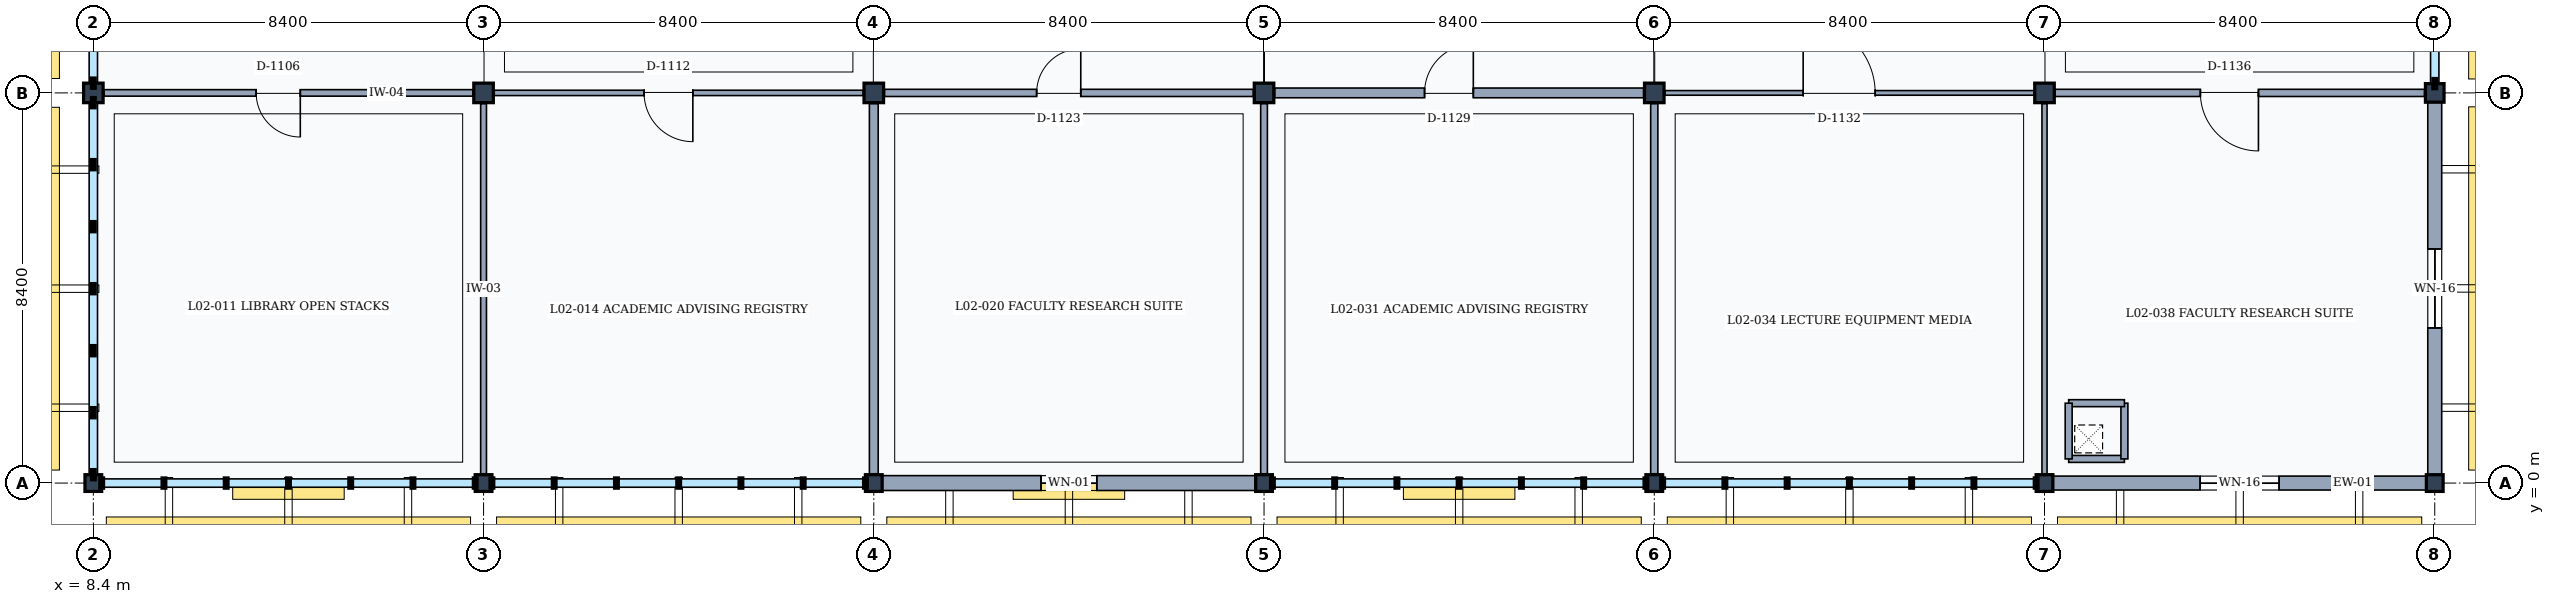
"""IFC4 building model, lengths in metres.
Left out: names, types, materials, properties, quantities, classifications, styles, units other than length and angle.
Written with IfcOpenShell. Run it as: python <this file> out.ifc"""

import sys

from ifc_helpers import new_model, si_unit, direction, frame, frame_2d, origin, origin_2d, place, context, subcontext, project, spatial, rectangle, extrude, element, fill, save


model = new_model("IFC4")
c1 = context("Model", 3, precision=1e-05, world=origin(), true_north=direction((0.0, 1.0)))
c2 = subcontext(c1, "Body", "Model", "MODEL_VIEW")
j1 = project(units=[si_unit("LENGTHUNIT", "METRE"), si_unit("PLANEANGLEUNIT", "RADIAN")], contexts=[c1])
p1 = place(None, origin())
s1 = spatial("IfcSite", under=j1, at=p1, CompositionType="ELEMENT")
p2 = place(p1, origin())
s2 = spatial("IfcBuilding", under=s1, at=p2, CompositionType="ELEMENT")
p3 = place(p2, frame((0.0, 0.0, 9.6)))
s3 = spatial("IfcBuildingStorey", under=s2, at=p3, CompositionType="ELEMENT", Elevation=9.6)
p4 = place(p3, frame((8.4, 0.0, 0.0), z_axis=(0.0, 0.0, 1.0), x_axis=(1.0, 0.0, 0.0)))
e1 = element("IfcColumn", 1, at=p4, inside=s3, PredefinedType="COLUMN", context=c2, shape_type="SweptSolid", body=[
    extrude(rectangle(XDim=0.36, YDim=0.36, at=origin_2d()), origin(), (0.0, 0.0, 1.0), 4.2),
])
p5 = place(p3, frame((8.4, 8.4, 0.0), z_axis=(0.0, 0.0, 1.0), x_axis=(1.0, 0.0, 0.0)))
e2 = element("IfcColumn", 2, at=p5, inside=s3, PredefinedType="COLUMN", context=c2, shape_type="SweptSolid", body=[
    extrude(rectangle(XDim=0.42, YDim=0.42, at=origin_2d()), origin(), (0.0, 0.0, 1.0), 4.2),
])
p6 = place(p3, frame((16.8, 0.0, 0.0), z_axis=(0.0, 0.0, 1.0), x_axis=(1.0, 0.0, 0.0)))
e3 = element("IfcColumn", 3, at=p6, inside=s3, PredefinedType="COLUMN", context=c2, shape_type="SweptSolid", body=[
    extrude(rectangle(XDim=0.36, YDim=0.36, at=origin_2d()), origin(), (0.0, 0.0, 1.0), 4.2),
])
p7 = place(p3, frame((16.8, 8.4, 0.0), z_axis=(0.0, 0.0, 1.0), x_axis=(1.0, 0.0, 0.0)))
e4 = element("IfcColumn", 4, at=p7, inside=s3, PredefinedType="COLUMN", context=c2, shape_type="SweptSolid", body=[
    extrude(rectangle(XDim=0.42, YDim=0.42, at=origin_2d()), origin(), (0.0, 0.0, 1.0), 4.2),
])
p8 = place(p3, frame((25.2, 0.0, 0.0), z_axis=(0.0, 0.0, 1.0), x_axis=(1.0, 0.0, 0.0)))
e5 = element("IfcColumn", 5, at=p8, inside=s3, PredefinedType="COLUMN", context=c2, shape_type="SweptSolid", body=[
    extrude(rectangle(XDim=0.36, YDim=0.36, at=origin_2d()), origin(), (0.0, 0.0, 1.0), 4.2),
])
p9 = place(p3, frame((25.2, 8.4, 0.0), z_axis=(0.0, 0.0, 1.0), x_axis=(1.0, 0.0, 0.0)))
e6 = element("IfcColumn", 6, at=p9, inside=s3, PredefinedType="COLUMN", context=c2, shape_type="SweptSolid", body=[
    extrude(rectangle(XDim=0.42, YDim=0.42, at=origin_2d()), origin(), (0.0, 0.0, 1.0), 4.2),
])
p10 = place(p3, frame((33.6, 0.0, 0.0), z_axis=(0.0, 0.0, 1.0), x_axis=(1.0, 0.0, 0.0)))
e7 = element("IfcColumn", 7, at=p10, inside=s3, PredefinedType="COLUMN", context=c2, shape_type="SweptSolid", body=[
    extrude(rectangle(XDim=0.36, YDim=0.36, at=origin_2d()), origin(), (0.0, 0.0, 1.0), 4.2),
])
p11 = place(p3, frame((33.6, 8.4, 0.0), z_axis=(0.0, 0.0, 1.0), x_axis=(1.0, 0.0, 0.0)))
e8 = element("IfcColumn", 8, at=p11, inside=s3, PredefinedType="COLUMN", context=c2, shape_type="SweptSolid", body=[
    extrude(rectangle(XDim=0.42, YDim=0.42, at=origin_2d()), origin(), (0.0, 0.0, 1.0), 4.2),
])
p12 = place(p3, frame((42.0, 0.0, 0.0), z_axis=(0.0, 0.0, 1.0), x_axis=(1.0, 0.0, 0.0)))
e9 = element("IfcColumn", 9, at=p12, inside=s3, PredefinedType="COLUMN", context=c2, shape_type="SweptSolid", body=[
    extrude(rectangle(XDim=0.36, YDim=0.36, at=origin_2d()), origin(), (0.0, 0.0, 1.0), 4.2),
])
p13 = place(p3, frame((42.0, 8.4, 0.0), z_axis=(0.0, 0.0, 1.0), x_axis=(1.0, 0.0, 0.0)))
e10 = element("IfcColumn", 10, at=p13, inside=s3, PredefinedType="COLUMN", context=c2, shape_type="SweptSolid", body=[
    extrude(rectangle(XDim=0.42, YDim=0.42, at=origin_2d()), origin(), (0.0, 0.0, 1.0), 4.2),
])
p14 = place(p3, frame((50.4, 0.0, 0.0), z_axis=(0.0, 0.0, 1.0), x_axis=(1.0, 0.0, 0.0)))
e11 = element("IfcColumn", 11, at=p14, inside=s3, PredefinedType="COLUMN", context=c2, shape_type="SweptSolid", body=[
    extrude(rectangle(XDim=0.36, YDim=0.36, at=origin_2d()), origin(), (0.0, 0.0, 1.0), 4.2),
])
p15 = place(p3, frame((50.4, 8.4, 0.0), z_axis=(0.0, 0.0, 1.0), x_axis=(1.0, 0.0, 0.0)))
e12 = element("IfcColumn", 12, at=p15, inside=s3, PredefinedType="COLUMN", context=c2, shape_type="SweptSolid", body=[
    extrude(rectangle(XDim=0.42, YDim=0.42, at=origin_2d()), origin(), (0.0, 0.0, 1.0), 4.2),
])
p16 = place(p3, frame((58.8, 0.0, 0.0), z_axis=(0.0, 0.0, 1.0), x_axis=(1.0, 0.0, 0.0)))
e13 = element("IfcColumn", 13, at=p16, inside=s3, PredefinedType="COLUMN", context=c2, shape_type="SweptSolid", body=[
    extrude(rectangle(XDim=0.36, YDim=0.36, at=origin_2d()), origin(), (0.0, 0.0, 1.0), 4.2),
])
p17 = place(p3, frame((58.8, 8.4, 0.0), z_axis=(0.0, 0.0, 1.0), x_axis=(1.0, 0.0, 0.0)))
e14 = element("IfcColumn", 14, at=p17, inside=s3, PredefinedType="COLUMN", context=c2, shape_type="SweptSolid", body=[
    extrude(rectangle(XDim=0.4, YDim=0.4, at=origin_2d()), origin(), (0.0, 0.0, 1.0), 4.2),
])
p18 = place(p3, frame((33.42, 0.0, 0.0), z_axis=(0.0, 0.0, 1.0), x_axis=(-1.0, 0.0, 0.0)))
e15 = element("IfcWall", 15, at=p18, inside=s3, PredefinedType="SOLIDWALL", context=c2, shape_type="SweptSolid", body=[
    extrude(rectangle(XDim=8.04, YDim=0.32, at=frame_2d((4.02, 0.0))), origin(), (0.0, 0.0, 1.0), 3.36),
])
p19 = place(p18, frame((3.42, 0.0, 0.9)))
e16 = element("IfcOpeningElement", 16, at=p19, cuts=e15, PredefinedType="OPENING", context=c2, shape_type="SweptSolid", body=[
    extrude(rectangle(XDim=1.2, YDim=1.8, at=frame_2d((0.6, 0.9))), frame((0.0, 0.17, 0.0), z_axis=(0.0, -1.0, 0.0), x_axis=(1.0, 0.0, 0.0)), (0.0, 0.0, 1.0), 0.34),
])
p20 = place(p3, frame((58.62, 0.0, 0.0), z_axis=(0.0, 0.0, 1.0), x_axis=(-1.0, 0.0, 0.0)))
e17 = element("IfcWall", 17, at=p20, inside=s3, PredefinedType="SOLIDWALL", context=c2, shape_type="SweptSolid", body=[
    extrude(rectangle(XDim=8.04, YDim=0.3, at=frame_2d((4.02, 0.0))), origin(), (0.0, 0.0, 1.0), 3.36),
])
p21 = place(p20, frame((3.17, 0.0, 0.9)))
e18 = element("IfcOpeningElement", 18, at=p21, cuts=e17, PredefinedType="OPENING", context=c2, shape_type="SweptSolid", body=[
    extrude(rectangle(XDim=1.7, YDim=1.55, at=frame_2d((0.85, 0.775))), frame((0.0, 0.16, 0.0), z_axis=(0.0, -1.0, 0.0), x_axis=(1.0, 0.0, 0.0)), (0.0, 0.0, 1.0), 0.32),
])
p22 = place(p3, frame((58.8, 8.2, 0.0), z_axis=(0.0, 0.0, 1.0), x_axis=(0.0, -1.0, 0.0)))
e19 = element("IfcWall", 19, at=p22, inside=s3, PredefinedType="SOLIDWALL", context=c2, shape_type="SweptSolid", body=[
    extrude(rectangle(XDim=8.02, YDim=0.3, at=frame_2d((4.01, 0.0))), origin(), (0.0, 0.0, 1.0), 3.36),
])
p23 = place(p22, frame((3.16, 0.0, 0.9)))
e20 = element("IfcOpeningElement", 20, at=p23, cuts=e19, PredefinedType="OPENING", context=c2, shape_type="SweptSolid", body=[
    extrude(rectangle(XDim=1.7, YDim=1.55, at=frame_2d((0.85, 0.775))), frame((0.0, 0.16, 0.0), z_axis=(0.0, -1.0, 0.0), x_axis=(1.0, 0.0, 0.0)), (0.0, 0.0, 1.0), 0.32),
])
p24 = place(p3, frame((50.92, 0.52, 0.0), z_axis=(0.0, 0.0, 1.0), x_axis=(1.0, 0.0, 0.0)))
e21 = element("IfcWall", 21, at=p24, inside=s3, PredefinedType="PARTITIONING", context=c2, shape_type="SweptSolid", body=[
    extrude(rectangle(XDim=1.2, YDim=0.15, at=frame_2d((0.6, 0.0))), origin(), (0.0, 0.0, 1.0), 3.93),
])
p25 = place(p3, frame((52.12, 0.52, 0.0), z_axis=(0.0, 0.0, 1.0), x_axis=(0.0, 1.0, 0.0)))
e22 = element("IfcWall", 22, at=p25, inside=s3, PredefinedType="PARTITIONING", context=c2, shape_type="SweptSolid", body=[
    extrude(rectangle(XDim=1.2, YDim=0.15, at=frame_2d((0.6, 0.0))), origin(), (0.0, 0.0, 1.0), 3.93),
])
p26 = place(p3, frame((52.12, 1.72, 0.0), z_axis=(0.0, 0.0, 1.0), x_axis=(-1.0, 0.0, 0.0)))
e23 = element("IfcWall", 23, at=p26, inside=s3, PredefinedType="PARTITIONING", context=c2, shape_type="SweptSolid", body=[
    extrude(rectangle(XDim=1.2, YDim=0.15, at=frame_2d((0.6, 0.0))), origin(), (0.0, 0.0, 1.0), 3.93),
])
p27 = place(p3, frame((50.92, 1.72, 0.0), z_axis=(0.0, 0.0, 1.0), x_axis=(0.0, -1.0, 0.0)))
e24 = element("IfcWall", 24, at=p27, inside=s3, PredefinedType="PARTITIONING", context=c2, shape_type="SweptSolid", body=[
    extrude(rectangle(XDim=1.2, YDim=0.15, at=frame_2d((0.6, 0.0))), origin(), (0.0, 0.0, 1.0), 3.93),
])
p28 = place(p3, frame((16.8, 0.2, 0.0), z_axis=(0.0, 0.0, 1.0), x_axis=(0.0, 1.0, 0.0)))
e25 = element("IfcWall", 25, at=p28, inside=s3, PredefinedType="PARTITIONING", context=c2, shape_type="SweptSolid", body=[
    extrude(rectangle(XDim=7.97, YDim=0.125, at=frame_2d((3.985, 0.0))), origin(), (0.0, 0.0, 1.0), 3.32),
])
p29 = place(p3, frame((8.63, 8.4, 0.0), z_axis=(0.0, 0.0, 1.0), x_axis=(1.0, 0.0, 0.0)))
e26 = element("IfcWall", 26, at=p29, inside=s3, PredefinedType="PARTITIONING", context=c2, shape_type="SweptSolid", body=[
    extrude(rectangle(XDim=7.94, YDim=0.14, at=frame_2d((3.97, 0.0))), origin(), (0.0, 0.0, 1.0), 3.32),
])
p30 = place(p29, frame((3.275, 0.0, 0.0)))
e27 = element("IfcOpeningElement", 27, at=p30, cuts=e26, PredefinedType="OPENING", context=c2, shape_type="SweptSolid", body=[
    extrude(rectangle(XDim=0.95, YDim=2.15, at=frame_2d((0.475, 1.075))), frame((0.0, 0.08, 0.0), z_axis=(0.0, -1.0, 0.0), x_axis=(1.0, 0.0, 0.0)), (0.0, 0.0, 1.0), 0.16),
])
p31 = place(p3, frame((25.2, 0.2, 0.0), z_axis=(0.0, 0.0, 1.0), x_axis=(0.0, 1.0, 0.0)))
e28 = element("IfcWall", 28, at=p31, inside=s3, PredefinedType="PARTITIONING", context=c2, shape_type="SweptSolid", body=[
    extrude(rectangle(XDim=7.97, YDim=0.19, at=frame_2d((3.985, 0.0))), origin(), (0.0, 0.0, 1.0), 3.32),
])
p32 = place(p3, frame((17.03, 8.4, 0.0), z_axis=(0.0, 0.0, 1.0), x_axis=(1.0, 0.0, 0.0)))
e29 = element("IfcWall", 29, at=p32, inside=s3, PredefinedType="PARTITIONING", context=c2, shape_type="SweptSolid", body=[
    extrude(rectangle(XDim=7.94, YDim=0.115, at=frame_2d((3.97, 0.0))), origin(), (0.0, 0.0, 1.0), 3.32),
])
p33 = place(p32, frame((3.225, 0.0, 0.0)))
e30 = element("IfcOpeningElement", 30, at=p33, cuts=e29, PredefinedType="OPENING", context=c2, shape_type="SweptSolid", body=[
    extrude(rectangle(XDim=1.05, YDim=2.2, at=frame_2d((0.525, 1.1))), frame((0.0, 0.067, 0.0), z_axis=(0.0, -1.0, 0.0), x_axis=(1.0, 0.0, 0.0)), (0.0, 0.0, 1.0), 0.135),
])
p34 = place(p3, frame((33.6, 0.2, 0.0), z_axis=(0.0, 0.0, 1.0), x_axis=(0.0, 1.0, 0.0)))
e31 = element("IfcWall", 31, at=p34, inside=s3, PredefinedType="PARTITIONING", context=c2, shape_type="SweptSolid", body=[
    extrude(rectangle(XDim=7.97, YDim=0.145, at=frame_2d((3.985, 0.0))), origin(), (0.0, 0.0, 1.0), 3.32),
])
p35 = place(p3, frame((25.43, 8.4, 0.0), z_axis=(0.0, 0.0, 1.0), x_axis=(1.0, 0.0, 0.0)))
e32 = element("IfcWall", 32, at=p35, inside=s3, PredefinedType="PARTITIONING", context=c2, shape_type="SweptSolid", body=[
    extrude(rectangle(XDim=7.94, YDim=0.155, at=frame_2d((3.97, 0.0))), origin(), (0.0, 0.0, 1.0), 3.32),
])
p36 = place(p35, frame((3.275, 0.0, 0.0)))
e33 = element("IfcOpeningElement", 33, at=p36, cuts=e32, PredefinedType="OPENING", context=c2, shape_type="SweptSolid", body=[
    extrude(rectangle(XDim=0.95, YDim=2.15, at=frame_2d((0.475, 1.075))), frame((0.0, 0.087, 0.0), z_axis=(0.0, -1.0, 0.0), x_axis=(1.0, 0.0, 0.0)), (0.0, 0.0, 1.0), 0.175),
])
p37 = place(p3, frame((42.0, 0.2, 0.0), z_axis=(0.0, 0.0, 1.0), x_axis=(0.0, 1.0, 0.0)))
e34 = element("IfcWall", 34, at=p37, inside=s3, PredefinedType="PARTITIONING", context=c2, shape_type="SweptSolid", body=[
    extrude(rectangle(XDim=7.97, YDim=0.155, at=frame_2d((3.985, 0.0))), origin(), (0.0, 0.0, 1.0), 3.32),
])
p38 = place(p3, frame((33.83, 8.4, 0.0), z_axis=(0.0, 0.0, 1.0), x_axis=(1.0, 0.0, 0.0)))
e35 = element("IfcWall", 35, at=p38, inside=s3, PredefinedType="PARTITIONING", context=c2, shape_type="SweptSolid", body=[
    extrude(rectangle(XDim=7.94, YDim=0.21, at=frame_2d((3.97, 0.0))), origin(), (0.0, 0.0, 1.0), 3.32),
])
p39 = place(p38, frame((3.225, 0.0, 0.0)))
e36 = element("IfcOpeningElement", 36, at=p39, cuts=e35, PredefinedType="OPENING", context=c2, shape_type="SweptSolid", body=[
    extrude(rectangle(XDim=1.05, YDim=2.2, at=frame_2d((0.525, 1.1))), frame((0.0, 0.115, 0.0), z_axis=(0.0, -1.0, 0.0), x_axis=(1.0, 0.0, 0.0)), (0.0, 0.0, 1.0), 0.23),
])
p40 = place(p3, frame((50.4, 0.2, 0.0), z_axis=(0.0, 0.0, 1.0), x_axis=(0.0, 1.0, 0.0)))
e37 = element("IfcWall", 37, at=p40, inside=s3, PredefinedType="PARTITIONING", context=c2, shape_type="SweptSolid", body=[
    extrude(rectangle(XDim=7.97, YDim=0.11, at=frame_2d((3.985, 0.0))), origin(), (0.0, 0.0, 1.0), 3.32),
])
p41 = place(p3, frame((42.23, 8.4, 0.0), z_axis=(0.0, 0.0, 1.0), x_axis=(1.0, 0.0, 0.0)))
e38 = element("IfcWall", 38, at=p41, inside=s3, PredefinedType="MOVABLE", context=c2, shape_type="SweptSolid", body=[
    extrude(rectangle(XDim=7.94, YDim=0.1, at=frame_2d((3.97, 0.0))), origin(), (0.0, 0.0, 1.0), 3.32),
])
p42 = place(p41, frame((2.975, 0.0, 0.0)))
e39 = element("IfcOpeningElement", 39, at=p42, cuts=e38, PredefinedType="OPENING", context=c2, shape_type="SweptSolid", body=[
    extrude(rectangle(XDim=1.55, YDim=2.35, at=frame_2d((0.775, 1.175))), frame((0.0, 0.06, 0.0), z_axis=(0.0, -1.0, 0.0), x_axis=(1.0, 0.0, 0.0)), (0.0, 0.0, 1.0), 0.12),
])
p43 = place(p3, frame((50.63, 8.4, 0.0), z_axis=(0.0, 0.0, 1.0), x_axis=(1.0, 0.0, 0.0)))
e40 = element("IfcWall", 40, at=p43, inside=s3, PredefinedType="PARTITIONING", context=c2, shape_type="SweptSolid", body=[
    extrude(rectangle(XDim=7.95, YDim=0.155, at=frame_2d((3.975, 0.0))), origin(), (0.0, 0.0, 1.0), 3.32),
])
p44 = place(p43, frame((3.125, 0.0, 0.0)))
e41 = element("IfcOpeningElement", 41, at=p44, cuts=e40, PredefinedType="OPENING", context=c2, shape_type="SweptSolid", body=[
    extrude(rectangle(XDim=1.25, YDim=2.3, at=frame_2d((0.625, 1.15))), frame((0.0, 0.087, 0.0), z_axis=(0.0, -1.0, 0.0), x_axis=(1.0, 0.0, 0.0)), (0.0, 0.0, 1.0), 0.175),
])
p45 = place(p19, origin())
e42 = element("IfcWindow", 42, at=p45, inside=s3, PartitioningType="SINGLE_PANEL", PredefinedType="WINDOW", context=c2, shape_type="SweptSolid", body=[
    extrude(rectangle(XDim=1.2, YDim=1.8, at=frame_2d((0.6, 0.9))), frame((0.0, 0.03, 0.0), z_axis=(0.0, -1.0, 0.0), x_axis=(1.0, 0.0, 0.0)), (0.0, 0.0, 1.0), 0.06),
])
fill(e16, e42)
p46 = place(p21, origin())
e43 = element("IfcWindow", 43, at=p46, inside=s3, PartitioningType="SINGLE_PANEL", PredefinedType="WINDOW", context=c2, shape_type="SweptSolid", body=[
    extrude(rectangle(XDim=1.7, YDim=1.55, at=frame_2d((0.85, 0.775))), frame((0.0, 0.03, 0.0), z_axis=(0.0, -1.0, 0.0), x_axis=(1.0, 0.0, 0.0)), (0.0, 0.0, 1.0), 0.06),
])
fill(e18, e43)
p47 = place(p23, origin())
e44 = element("IfcWindow", 44, at=p47, inside=s3, PartitioningType="SINGLE_PANEL", PredefinedType="WINDOW", context=c2, shape_type="SweptSolid", body=[
    extrude(rectangle(XDim=1.7, YDim=1.55, at=frame_2d((0.85, 0.775))), frame((0.0, 0.03, 0.0), z_axis=(0.0, -1.0, 0.0), x_axis=(1.0, 0.0, 0.0)), (0.0, 0.0, 1.0), 0.06),
])
fill(e20, e44)
p48 = place(p30, frame((0.95, 0.0, 0.0), z_axis=(0.0, 0.0, 1.0), x_axis=(-1.0, 0.0, 0.0)))
e45 = element("IfcDoor", 45, at=p48, inside=s3, OperationType="SINGLE_SWING_LEFT", PredefinedType="DOOR", context=c2, shape_type="SweptSolid", body=[
    extrude(rectangle(XDim=0.95, YDim=2.15, at=frame_2d((0.475, 1.075))), frame((0.0, 0.025, 0.0), z_axis=(0.0, -1.0, 0.0), x_axis=(1.0, 0.0, 0.0)), (0.0, 0.0, 1.0), 0.05),
])
fill(e27, e45)
p49 = place(p33, frame((1.05, 0.0, 0.0), z_axis=(0.0, 0.0, 1.0), x_axis=(-1.0, 0.0, 0.0)))
e46 = element("IfcDoor", 46, at=p49, inside=s3, OperationType="SINGLE_SWING_LEFT", PredefinedType="DOOR", context=c2, shape_type="SweptSolid", body=[
    extrude(rectangle(XDim=1.05, YDim=2.2, at=frame_2d((0.525, 1.1))), frame((0.0, 0.025, 0.0), z_axis=(0.0, -1.0, 0.0), x_axis=(1.0, 0.0, 0.0)), (0.0, 0.0, 1.0), 0.05),
])
fill(e30, e46)
p50 = place(p36, origin())
e47 = element("IfcDoor", 47, at=p50, inside=s3, OperationType="SINGLE_SWING_RIGHT", PredefinedType="DOOR", context=c2, shape_type="SweptSolid", body=[
    extrude(rectangle(XDim=0.95, YDim=2.15, at=frame_2d((0.475, 1.075))), frame((0.0, 0.025, 0.0), z_axis=(0.0, -1.0, 0.0), x_axis=(1.0, 0.0, 0.0)), (0.0, 0.0, 1.0), 0.05),
])
fill(e33, e47)
p51 = place(p39, origin())
e48 = element("IfcDoor", 48, at=p51, inside=s3, OperationType="SINGLE_SWING_RIGHT", PredefinedType="DOOR", context=c2, shape_type="SweptSolid", body=[
    extrude(rectangle(XDim=1.05, YDim=2.2, at=frame_2d((0.525, 1.1))), frame((0.0, 0.025, 0.0), z_axis=(0.0, -1.0, 0.0), x_axis=(1.0, 0.0, 0.0)), (0.0, 0.0, 1.0), 0.05),
])
fill(e36, e48)
p52 = place(p42, origin())
e49 = element("IfcDoor", 49, at=p52, inside=s3, OperationType="SINGLE_SWING_LEFT", PredefinedType="DOOR", context=c2, shape_type="SweptSolid", body=[
    extrude(rectangle(XDim=1.55, YDim=2.35, at=frame_2d((0.775, 1.175))), frame((0.0, 0.025, 0.0), z_axis=(0.0, -1.0, 0.0), x_axis=(1.0, 0.0, 0.0)), (0.0, 0.0, 1.0), 0.05),
])
fill(e39, e49)
p53 = place(p44, frame((1.25, 0.0, 0.0), z_axis=(0.0, 0.0, 1.0), x_axis=(-1.0, 0.0, 0.0)))
e50 = element("IfcDoor", 50, at=p53, inside=s3, OperationType="SINGLE_SWING_LEFT", PredefinedType="DOOR", context=c2, shape_type="SweptSolid", body=[
    extrude(rectangle(XDim=1.25, YDim=2.3, at=frame_2d((0.625, 1.15))), frame((0.0, 0.025, 0.0), z_axis=(0.0, -1.0, 0.0), x_axis=(1.0, 0.0, 0.0)), (0.0, 0.0, 1.0), 0.05),
])
fill(e41, e50)
save(model, sys.argv[1])
